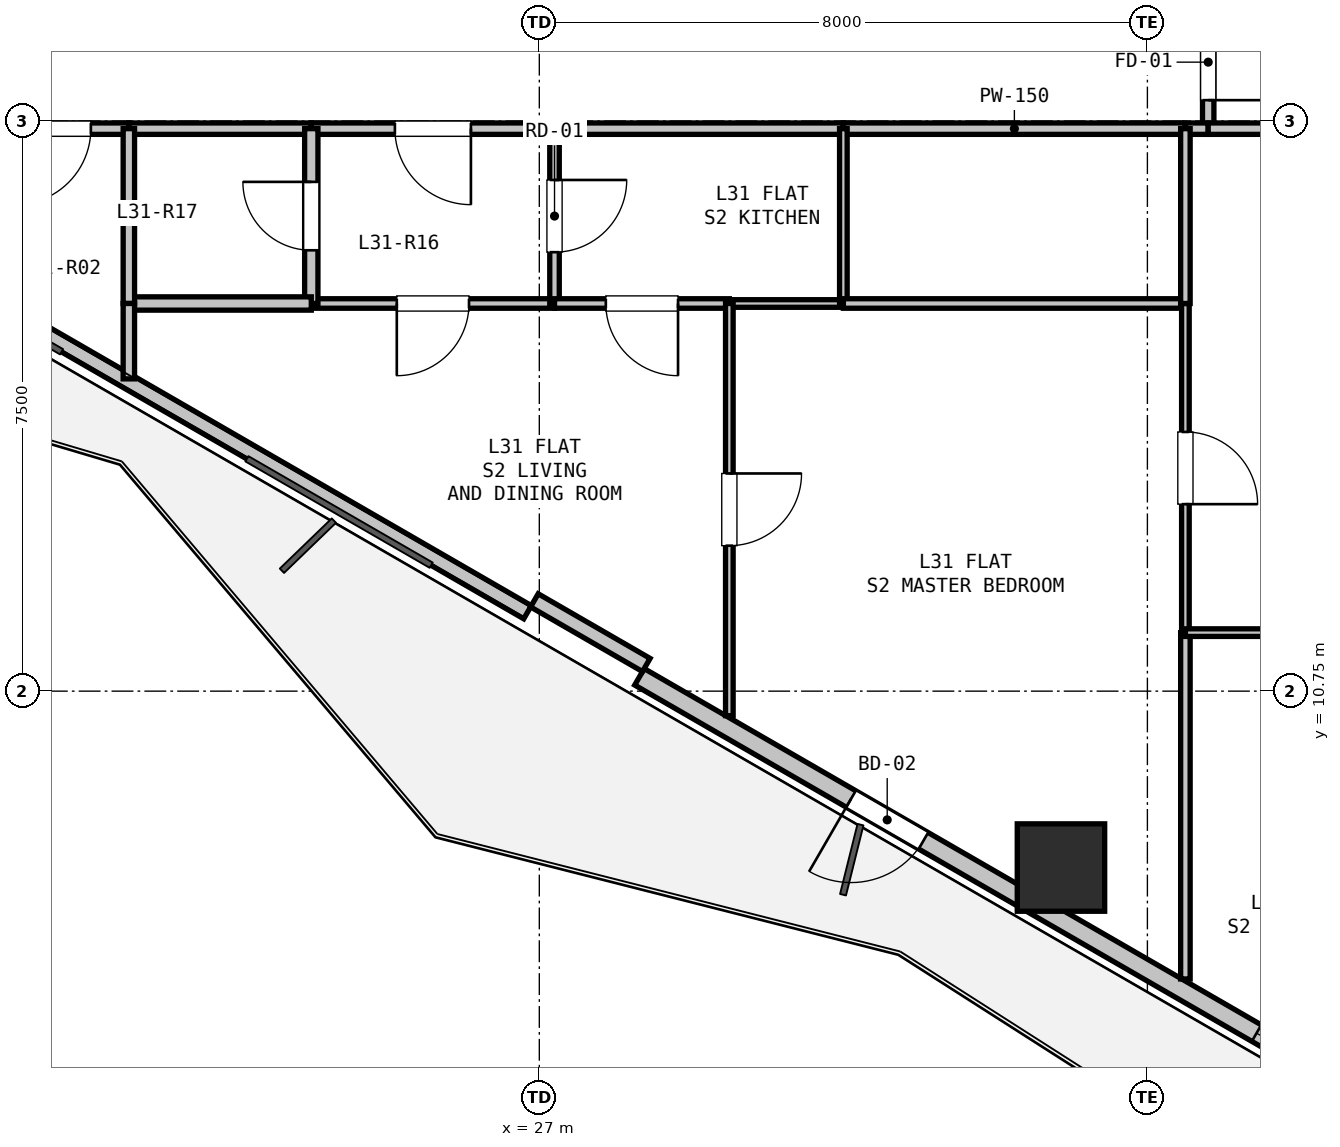
"""IFC4 building model, lengths in metres.
Left out: names, types, materials, properties, quantities, classifications, styles, units other than length and angle.
Written with IfcOpenShell. Run it as: python <this file> out.ifc"""

import sys

from ifc_helpers import new_model, si_unit, direction, frame, frame_2d, origin, origin_2d, place, context, subcontext, project, spatial, rectangle, hollow_rectangle, extrude, element, fill, save


model = new_model("IFC4")
c1 = context("Model", 3, precision=1e-05, world=origin(), true_north=direction((0.0, 1.0)))
c2 = subcontext(c1, "Body", "Model", "MODEL_VIEW")
j1 = project(units=[si_unit("LENGTHUNIT", "METRE"), si_unit("PLANEANGLEUNIT", "RADIAN")], contexts=[c1])
p1 = place(None, origin())
s1 = spatial("IfcSite", under=j1, at=p1, CompositionType="ELEMENT")
p2 = place(p1, origin())
s2 = spatial("IfcBuilding", under=s1, at=p2, CompositionType="ELEMENT")
p3 = place(p2, frame((0.0, 0.0, 113.1)))
s3 = spatial("IfcBuildingStorey", under=s2, at=p3, CompositionType="ELEMENT", Elevation=113.1)
p4 = place(p3, frame((33.863, 8.429, 0.0), z_axis=(0.0, 0.0, 1.0), x_axis=(1.0, 0.0, 0.0)))
e1 = element("IfcColumn", 1, at=p4, inside=s3, PredefinedType="COLUMN", context=c2, shape_type="SweptSolid", body=[
    extrude(hollow_rectangle(XDim=1.15, YDim=1.15, WallThickness=0.032, at=origin_2d()), origin(), (0.0, 0.0, 1.0), 3.3),
])
p5 = place(p3, frame((38.649, 4.973, 0.0), z_axis=(0.0, 0.0, 1.0), x_axis=(-0.866023023012, 0.500004123596, 0.0)))
e2 = element("IfcWall", 2, at=p5, inside=s3, PredefinedType="SOLIDWALL", context=c2, shape_type="SweptSolid", body=[
    extrude(rectangle(XDim=11.93, YDim=0.25, at=frame_2d((5.965, 0.0))), origin(), (0.0, 0.0, 1.0), 2.64),
])
p6 = place(p5, frame((7.616, 0.0, 0.0)))
e3 = element("IfcOpeningElement", 3, at=p6, cuts=e2, PredefinedType="OPENING", context=c2, shape_type="SweptSolid", body=[
    extrude(rectangle(XDim=1.1, YDim=2.1, at=frame_2d((0.55, 1.05))), frame((0.0, 0.135, 0.0), z_axis=(0.0, -1.0, 0.0), x_axis=(1.0, 0.0, 0.0)), (0.0, 0.0, 1.0), 0.27),
])
p7 = place(p5, frame((1.355, 0.0, 0.9)))
e4 = element("IfcOpeningElement", 4, at=p7, cuts=e2, PredefinedType="OPENING", context=c2, shape_type="SweptSolid", body=[
    extrude(rectangle(XDim=1.2, YDim=1.4, at=frame_2d((0.6, 0.7))), frame((0.0, 0.135, 0.0), z_axis=(0.0, -1.0, 0.0), x_axis=(1.0, 0.0, 0.0)), (0.0, 0.0, 1.0), 0.27),
])
p8 = place(p3, frame((26.845, 11.788, 0.0), z_axis=(0.0, 0.0, 1.0), x_axis=(-0.866027010039, 0.499997217876, 0.0)))
e5 = element("IfcWall", 5, at=p8, inside=s3, PredefinedType="PARAPET", context=c2, shape_type="SweptSolid", body=[
    extrude(rectangle(XDim=11.229, YDim=0.2, at=frame_2d((5.615, 0.0))), origin(), (0.0, 0.0, 1.0), 0.2),
])
p9 = place(p3, frame((28.407, 11.094, 0.0), z_axis=(0.0, 0.0, 1.0), x_axis=(-0.86605165483, 0.499954529098, 0.0)))
e6 = element("IfcWall", 6, at=p9, inside=s3, PredefinedType="PARAPET", context=c2, shape_type="SweptSolid", body=[
    extrude(rectangle(XDim=1.7, YDim=0.2, at=frame_2d((0.85, 0.0))), origin(), (0.0, 0.0, 1.0), 2.64),
])
p10 = place(p3, frame((35.8, 19.9, 0.0), z_axis=(0.0, 0.0, 1.0), x_axis=(0.0, -1.0, 0.0)))
e7 = element("IfcWall", 7, at=p10, inside=s3, PredefinedType="PARTITIONING", context=c2, shape_type="SweptSolid", body=[
    extrude(rectangle(XDim=1.75, YDim=0.15, at=frame_2d((0.875, 0.0))), origin(), (0.0, 0.0, 1.0), 3.02),
])
p11 = place(p10, frame((0.375, 0.0, 0.0)))
e8 = element("IfcOpeningElement", 8, at=p11, cuts=e7, PredefinedType="OPENING", context=c2, shape_type="SweptSolid", body=[
    extrude(rectangle(XDim=1.0, YDim=2.15, at=frame_2d((0.5, 1.075))), frame((0.0, 0.085, 0.0), z_axis=(0.0, -1.0, 0.0), x_axis=(1.0, 0.0, 0.0)), (0.0, 0.0, 1.0), 0.17),
])
p12 = place(p3, frame((35.8, 18.15, 0.0), z_axis=(0.0, 0.0, 1.0), x_axis=(-1.0, 0.0, 0.0)))
e9 = element("IfcWall", 9, at=p12, inside=s3, PredefinedType="PARTITIONING", context=c2, shape_type="SweptSolid", body=[
    extrude(rectangle(XDim=0.3, YDim=0.15, at=frame_2d((0.15, 0.0))), origin(), (0.0, 0.0, 1.0), 3.02),
])
p13 = place(p3, frame((35.5, 18.15, 0.0), z_axis=(0.0, 0.0, 1.0), x_axis=(-1.0, 0.0, 0.0)))
e10 = element("IfcWall", 10, at=p13, inside=s3, PredefinedType="PARTITIONING", context=c2, shape_type="SweptSolid", body=[
    extrude(rectangle(XDim=4.5, YDim=0.15, at=frame_2d((2.25, 0.0))), origin(), (0.0, 0.0, 1.0), 3.02),
])
p14 = place(p3, frame((31.0, 18.15, 0.0), z_axis=(0.0, 0.0, 1.0), x_axis=(-1.0, 0.0, 0.0)))
e11 = element("IfcWall", 11, at=p14, inside=s3, PredefinedType="PARTITIONING", context=c2, shape_type="SweptSolid", body=[
    extrude(rectangle(XDim=3.8, YDim=0.15, at=frame_2d((1.9, 0.0))), origin(), (0.0, 0.0, 1.0), 3.02),
])
p15 = place(p3, frame((27.2, 18.15, 0.0), z_axis=(0.0, 0.0, 1.0), x_axis=(-1.0, 0.0, 0.0)))
e12 = element("IfcWall", 12, at=p15, inside=s3, PredefinedType="PARTITIONING", context=c2, shape_type="SweptSolid", body=[
    extrude(rectangle(XDim=3.2, YDim=0.15, at=frame_2d((1.6, 0.0))), origin(), (0.0, 0.0, 1.0), 2.393),
])
p16 = place(p15, frame((1.1, 0.0, 0.0)))
e13 = element("IfcOpeningElement", 13, at=p16, cuts=e12, PredefinedType="OPENING", context=c2, shape_type="SweptSolid", body=[
    extrude(rectangle(XDim=1.0, YDim=2.15, at=frame_2d((0.5, 1.075))), frame((0.0, 0.085, 0.0), z_axis=(0.0, -1.0, 0.0), x_axis=(1.0, 0.0, 0.0)), (0.0, 0.0, 1.0), 0.17),
])
p17 = place(p3, frame((24.0, 18.15, 0.0), z_axis=(0.0, 0.0, 1.0), x_axis=(-1.0, 0.0, 0.0)))
e14 = element("IfcWall", 14, at=p17, inside=s3, PredefinedType="PARTITIONING", context=c2, shape_type="SweptSolid", body=[
    extrude(rectangle(XDim=2.4, YDim=0.15, at=frame_2d((1.2, 0.0))), origin(), (0.0, 0.0, 1.0), 2.393),
])
p18 = place(p3, frame((21.6, 18.15, 0.0), z_axis=(0.0, 0.0, 1.0), x_axis=(-1.0, 0.0, 0.0)))
e15 = element("IfcWall", 15, at=p18, inside=s3, PredefinedType="PARTITIONING", context=c2, shape_type="SweptSolid", body=[
    extrude(rectangle(XDim=2.0, YDim=0.15, at=frame_2d((1.0, 0.0))), origin(), (0.0, 0.0, 1.0), 3.02),
])
p19 = place(p18, frame((0.5, 0.0, 0.0)))
e16 = element("IfcOpeningElement", 16, at=p19, cuts=e15, PredefinedType="OPENING", context=c2, shape_type="SweptSolid", body=[
    extrude(rectangle(XDim=1.0, YDim=2.15, at=frame_2d((0.5, 1.075))), frame((0.0, 0.085, 0.0), z_axis=(0.0, -1.0, 0.0), x_axis=(1.0, 0.0, 0.0)), (0.0, 0.0, 1.0), 0.17),
])
p20 = place(p3, frame((38.4, 18.15, 0.0), z_axis=(0.0, 0.0, 1.0), x_axis=(-1.0, 0.0, 0.0)))
e17 = element("IfcWall", 17, at=p20, inside=s3, PredefinedType="PARTITIONING", context=c2, shape_type="SweptSolid", body=[
    extrude(rectangle(XDim=2.6, YDim=0.15, at=frame_2d((1.3, 0.0))), origin(), (0.0, 0.0, 1.0), 2.393),
])
p21 = place(p3, frame((27.2, 15.85, 0.0), z_axis=(0.0, 0.0, 1.0), x_axis=(-1.0, 0.0, 0.0)))
e18 = element("IfcWall", 18, at=p21, inside=s3, PredefinedType="PARTITIONING", context=c2, shape_type="SweptSolid", body=[
    extrude(rectangle(XDim=3.2, YDim=0.125, at=frame_2d((1.6, 0.0))), origin(), (0.0, 0.0, 1.0), 2.393),
])
p22 = place(p21, frame((1.125, 0.0, 0.0)))
e19 = element("IfcOpeningElement", 19, at=p22, cuts=e18, PredefinedType="OPENING", context=c2, shape_type="SweptSolid", body=[
    extrude(rectangle(XDim=0.95, YDim=2.1, at=frame_2d((0.475, 1.05))), frame((0.0, 0.073, 0.0), z_axis=(0.0, -1.0, 0.0), x_axis=(1.0, 0.0, 0.0)), (0.0, 0.0, 1.0), 0.145),
])
p23 = place(p3, frame((24.0, 15.85, 0.0), z_axis=(0.0, 0.0, 1.0), x_axis=(0.0, 1.0, 0.0)))
e20 = element("IfcWall", 20, at=p23, inside=s3, PredefinedType="PLUMBINGWALL", context=c2, shape_type="SweptSolid", body=[
    extrude(rectangle(XDim=2.3, YDim=0.175, at=frame_2d((1.15, 0.0))), origin(), (0.0, 0.0, 1.0), 2.393),
])
p24 = place(p23, frame((0.7, 0.0, 0.0)))
e21 = element("IfcOpeningElement", 21, at=p24, cuts=e20, PredefinedType="OPENING", context=c2, shape_type="SweptSolid", body=[
    extrude(rectangle(XDim=0.9, YDim=2.1, at=frame_2d((0.45, 1.05))), frame((0.0, 0.097, 0.0), z_axis=(0.0, -1.0, 0.0), x_axis=(1.0, 0.0, 0.0)), (0.0, 0.0, 1.0), 0.195),
])
p25 = place(p3, frame((27.2, 18.15, 0.0), z_axis=(0.0, 0.0, 1.0), x_axis=(0.0, -1.0, 0.0)))
e22 = element("IfcWall", 22, at=p25, inside=s3, PredefinedType="PARTITIONING", context=c2, shape_type="SweptSolid", body=[
    extrude(rectangle(XDim=2.3, YDim=0.125, at=frame_2d((1.15, 0.0))), origin(), (0.0, 0.0, 1.0), 3.02),
])
p26 = place(p25, frame((0.675, 0.0, 0.0)))
e23 = element("IfcOpeningElement", 23, at=p26, cuts=e22, PredefinedType="OPENING", context=c2, shape_type="SweptSolid", body=[
    extrude(rectangle(XDim=0.95, YDim=2.1, at=frame_2d((0.475, 1.05))), frame((0.0, 0.073, 0.0), z_axis=(0.0, -1.0, 0.0), x_axis=(1.0, 0.0, 0.0)), (0.0, 0.0, 1.0), 0.145),
])
p27 = place(p3, frame((24.0, 15.85, 0.0), z_axis=(0.0, 0.0, 1.0), x_axis=(-1.0, 0.0, 0.0)))
e24 = element("IfcWall", 24, at=p27, inside=s3, PredefinedType="PLUMBINGWALL", context=c2, shape_type="SweptSolid", body=[
    extrude(rectangle(XDim=2.4, YDim=0.175, at=frame_2d((1.2, 0.0))), origin(), (0.0, 0.0, 1.0), 3.02),
])
p28 = place(p3, frame((21.6, 15.85, 0.0), z_axis=(0.0, 0.0, 1.0), x_axis=(0.0, 1.0, 0.0)))
e25 = element("IfcWall", 25, at=p28, inside=s3, PredefinedType="PARTITIONING", context=c2, shape_type="SweptSolid", body=[
    extrude(rectangle(XDim=2.3, YDim=0.15, at=frame_2d((1.15, 0.0))), origin(), (0.0, 0.0, 1.0), 3.02),
])
p29 = place(p3, frame((31.0, 15.85, 0.0), z_axis=(0.0, 0.0, 1.0), x_axis=(-1.0, 0.0, 0.0)))
e26 = element("IfcWall", 26, at=p29, inside=s3, PredefinedType="PARTITIONING", context=c2, shape_type="SweptSolid", body=[
    extrude(rectangle(XDim=1.5, YDim=0.1, at=frame_2d((0.75, 0.0))), origin(), (0.0, 0.0, 1.0), 3.02),
])
p30 = place(p3, frame((29.5, 15.85, 0.0), z_axis=(0.0, 0.0, 1.0), x_axis=(-1.0, 0.0, 0.0)))
e27 = element("IfcWall", 27, at=p30, inside=s3, PredefinedType="PARTITIONING", context=c2, shape_type="SweptSolid", body=[
    extrude(rectangle(XDim=2.3, YDim=0.125, at=frame_2d((1.15, 0.0))), origin(), (0.0, 0.0, 1.0), 3.02),
])
p31 = place(p30, frame((0.675, 0.0, 0.0)))
e28 = element("IfcOpeningElement", 28, at=p31, cuts=e27, PredefinedType="OPENING", context=c2, shape_type="SweptSolid", body=[
    extrude(rectangle(XDim=0.95, YDim=2.1, at=frame_2d((0.475, 1.05))), frame((0.0, 0.073, 0.0), z_axis=(0.0, -1.0, 0.0), x_axis=(1.0, 0.0, 0.0)), (0.0, 0.0, 1.0), 0.145),
])
p32 = place(p3, frame((31.0, 18.15, 0.0), z_axis=(0.0, 0.0, 1.0), x_axis=(0.0, -1.0, 0.0)))
e29 = element("IfcWall", 29, at=p32, inside=s3, PredefinedType="PARTITIONING", context=c2, shape_type="SweptSolid", body=[
    extrude(rectangle(XDim=2.3, YDim=0.1, at=frame_2d((1.15, 0.0))), origin(), (0.0, 0.0, 1.0), 3.02),
])
p33 = place(p3, frame((21.6, 15.85, 0.0), z_axis=(0.0, 0.0, 1.0), x_axis=(0.0, -1.0, 0.0)))
e30 = element("IfcWall", 30, at=p33, inside=s3, PredefinedType="PARTITIONING", context=c2, shape_type="SweptSolid", body=[
    extrude(rectangle(XDim=0.992, YDim=0.15, at=frame_2d((0.496, 0.0))), origin(), (0.0, 0.0, 1.0), 2.365),
])
p34 = place(p3, frame((29.5, 15.85, 0.0), z_axis=(0.0, 0.0, 1.0), x_axis=(0.0, -1.0, 0.0)))
e31 = element("IfcWall", 31, at=p34, inside=s3, PredefinedType="PARTITIONING", context=c2, shape_type="SweptSolid", body=[
    extrude(rectangle(XDim=5.423, YDim=0.1, at=frame_2d((2.711, 0.0))), origin(), (0.0, 0.0, 1.0), 2.365),
])
p35 = place(p34, frame((2.236, 0.0, 0.0)))
e32 = element("IfcOpeningElement", 32, at=p35, cuts=e31, PredefinedType="OPENING", context=c2, shape_type="SweptSolid", body=[
    extrude(rectangle(XDim=0.95, YDim=2.1, at=frame_2d((0.475, 1.05))), frame((0.0, 0.06, 0.0), z_axis=(0.0, -1.0, 0.0), x_axis=(1.0, 0.0, 0.0)), (0.0, 0.0, 1.0), 0.12),
])
p36 = place(p3, frame((31.0, 15.85, 0.0), z_axis=(0.0, 0.0, 1.0), x_axis=(1.0, 0.0, 0.0)))
e33 = element("IfcWall", 33, at=p36, inside=s3, PredefinedType="PARTITIONING", context=c2, shape_type="SweptSolid", body=[
    extrude(rectangle(XDim=4.5, YDim=0.125, at=frame_2d((2.25, 0.0))), origin(), (0.0, 0.0, 1.0), 3.02),
])
p37 = place(p3, frame((35.5, 15.85, 0.0), z_axis=(0.0, 0.0, 1.0), x_axis=(0.0, -1.0, 0.0)))
e34 = element("IfcWall", 34, at=p37, inside=s3, PredefinedType="PARTITIONING", context=c2, shape_type="SweptSolid", body=[
    extrude(rectangle(XDim=4.33, YDim=0.1, at=frame_2d((2.165, 0.0))), origin(), (0.0, 0.0, 1.0), 3.02),
])
p38 = place(p37, frame((1.69, 0.0, 0.0)))
e35 = element("IfcOpeningElement", 35, at=p38, cuts=e34, PredefinedType="OPENING", context=c2, shape_type="SweptSolid", body=[
    extrude(rectangle(XDim=0.95, YDim=2.1, at=frame_2d((0.475, 1.05))), frame((0.0, 0.06, 0.0), z_axis=(0.0, -1.0, 0.0), x_axis=(1.0, 0.0, 0.0)), (0.0, 0.0, 1.0), 0.12),
])
p39 = place(p3, frame((35.5, 11.52, 0.0), z_axis=(0.0, 0.0, 1.0), x_axis=(0.0, -1.0, 0.0)))
e36 = element("IfcWall", 36, at=p39, inside=s3, PredefinedType="PARTITIONING", context=c2, shape_type="SweptSolid", body=[
    extrude(rectangle(XDim=4.557, YDim=0.125, at=frame_2d((2.278, 0.0))), origin(), (0.0, 0.0, 1.0), 2.684),
])
p40 = place(p3, frame((35.5, 11.52, 0.0), z_axis=(0.0, 0.0, 1.0), x_axis=(1.0, 0.0, 0.0)))
e37 = element("IfcWall", 37, at=p40, inside=s3, PredefinedType="PARTITIONING", context=c2, shape_type="SweptSolid", body=[
    extrude(rectangle(XDim=3.77, YDim=0.1, at=frame_2d((1.885, 0.0))), origin(), (0.0, 0.0, 1.0), 3.02),
])
p41 = place(p40, frame((1.41, 0.0, 0.0)))
e38 = element("IfcOpeningElement", 38, at=p41, cuts=e37, PredefinedType="OPENING", context=c2, shape_type="SweptSolid", body=[
    extrude(rectangle(XDim=0.95, YDim=2.1, at=frame_2d((0.475, 1.05))), frame((0.0, 0.06, 0.0), z_axis=(0.0, -1.0, 0.0), x_axis=(1.0, 0.0, 0.0)), (0.0, 0.0, 1.0), 0.12),
])
p42 = place(p3, frame((35.5, 15.85, 0.0), z_axis=(0.0, 0.0, 1.0), x_axis=(0.0, 1.0, 0.0)))
e39 = element("IfcWall", 39, at=p42, inside=s3, PredefinedType="PARTITIONING", context=c2, shape_type="SweptSolid", body=[
    extrude(rectangle(XDim=2.3, YDim=0.125, at=frame_2d((1.15, 0.0))), origin(), (0.0, 0.0, 1.0), 3.02),
])
p43 = place(p6, origin())
e40 = element("IfcDoor", 40, at=p43, inside=s3, OperationType="SINGLE_SWING_RIGHT", PredefinedType="DOOR", context=c2, shape_type="SweptSolid", body=[
    extrude(rectangle(XDim=1.1, YDim=2.1, at=frame_2d((0.55, 1.05))), frame((0.0, 0.025, 0.0), z_axis=(0.0, -1.0, 0.0), x_axis=(1.0, 0.0, 0.0)), (0.0, 0.0, 1.0), 0.05),
])
fill(e3, e40)
p44 = place(p7, origin())
e41 = element("IfcWindow", 41, at=p44, inside=s3, PartitioningType="SINGLE_PANEL", PredefinedType="WINDOW", context=c2, shape_type="SweptSolid", body=[
    extrude(rectangle(XDim=1.2, YDim=1.4, at=frame_2d((0.6, 0.7))), frame((0.0, 0.03, 0.0), z_axis=(0.0, -1.0, 0.0), x_axis=(1.0, 0.0, 0.0)), (0.0, 0.0, 1.0), 0.06),
])
fill(e4, e41)
p45 = place(p11, origin())
e42 = element("IfcDoor", 42, at=p45, inside=s3, OperationType="SINGLE_SWING_RIGHT", PredefinedType="DOOR", context=c2, shape_type="SweptSolid", body=[
    extrude(rectangle(XDim=1.0, YDim=2.15, at=frame_2d((0.5, 1.075))), frame((0.0, 0.025, 0.0), z_axis=(0.0, -1.0, 0.0), x_axis=(1.0, 0.0, 0.0)), (0.0, 0.0, 1.0), 0.05),
])
fill(e8, e42)
p46 = place(p16, origin())
e43 = element("IfcDoor", 43, at=p46, inside=s3, OperationType="SINGLE_SWING_LEFT", PredefinedType="DOOR", context=c2, shape_type="SweptSolid", body=[
    extrude(rectangle(XDim=1.0, YDim=2.15, at=frame_2d((0.5, 1.075))), frame((0.0, 0.025, 0.0), z_axis=(0.0, -1.0, 0.0), x_axis=(1.0, 0.0, 0.0)), (0.0, 0.0, 1.0), 0.05),
])
fill(e13, e43)
p47 = place(p19, origin())
e44 = element("IfcDoor", 44, at=p47, inside=s3, OperationType="SINGLE_SWING_RIGHT", PredefinedType="DOOR", context=c2, shape_type="SweptSolid", body=[
    extrude(rectangle(XDim=1.0, YDim=2.15, at=frame_2d((0.5, 1.075))), frame((0.0, 0.025, 0.0), z_axis=(0.0, -1.0, 0.0), x_axis=(1.0, 0.0, 0.0)), (0.0, 0.0, 1.0), 0.05),
])
fill(e16, e44)
p48 = place(p24, origin())
e45 = element("IfcDoor", 45, at=p48, inside=s3, OperationType="SINGLE_SWING_RIGHT", PredefinedType="DOOR", context=c2, shape_type="SweptSolid", body=[
    extrude(rectangle(XDim=0.9, YDim=2.1, at=frame_2d((0.45, 1.05))), frame((0.0, 0.025, 0.0), z_axis=(0.0, -1.0, 0.0), x_axis=(1.0, 0.0, 0.0)), (0.0, 0.0, 1.0), 0.05),
])
fill(e21, e45)
p49 = place(p26, origin())
e46 = element("IfcDoor", 46, at=p49, inside=s3, OperationType="SINGLE_SWING_LEFT", PredefinedType="DOOR", context=c2, shape_type="SweptSolid", body=[
    extrude(rectangle(XDim=0.95, YDim=2.1, at=frame_2d((0.475, 1.05))), frame((0.0, 0.025, 0.0), z_axis=(0.0, -1.0, 0.0), x_axis=(1.0, 0.0, 0.0)), (0.0, 0.0, 1.0), 0.05),
])
fill(e23, e46)
p50 = place(p22, origin())
e47 = element("IfcDoor", 47, at=p50, inside=s3, OperationType="SINGLE_SWING_RIGHT", PredefinedType="DOOR", context=c2, shape_type="SweptSolid", body=[
    extrude(rectangle(XDim=0.95, YDim=2.1, at=frame_2d((0.475, 1.05))), frame((0.0, 0.025, 0.0), z_axis=(0.0, -1.0, 0.0), x_axis=(1.0, 0.0, 0.0)), (0.0, 0.0, 1.0), 0.05),
])
fill(e19, e47)
p51 = place(p31, origin())
e48 = element("IfcDoor", 48, at=p51, inside=s3, OperationType="SINGLE_SWING_LEFT", PredefinedType="DOOR", context=c2, shape_type="SweptSolid", body=[
    extrude(rectangle(XDim=0.95, YDim=2.1, at=frame_2d((0.475, 1.05))), frame((0.0, 0.025, 0.0), z_axis=(0.0, -1.0, 0.0), x_axis=(1.0, 0.0, 0.0)), (0.0, 0.0, 1.0), 0.05),
])
fill(e28, e48)
p52 = place(p35, origin())
e49 = element("IfcDoor", 49, at=p52, inside=s3, OperationType="SINGLE_SWING_LEFT", PredefinedType="DOOR", context=c2, shape_type="SweptSolid", body=[
    extrude(rectangle(XDim=0.95, YDim=2.1, at=frame_2d((0.475, 1.05))), frame((0.0, 0.025, 0.0), z_axis=(0.0, -1.0, 0.0), x_axis=(1.0, 0.0, 0.0)), (0.0, 0.0, 1.0), 0.05),
])
fill(e32, e49)
p53 = place(p38, origin())
e50 = element("IfcDoor", 50, at=p53, inside=s3, OperationType="SINGLE_SWING_RIGHT", PredefinedType="DOOR", context=c2, shape_type="SweptSolid", body=[
    extrude(rectangle(XDim=0.95, YDim=2.1, at=frame_2d((0.475, 1.05))), frame((0.0, 0.025, 0.0), z_axis=(0.0, -1.0, 0.0), x_axis=(1.0, 0.0, 0.0)), (0.0, 0.0, 1.0), 0.05),
])
fill(e35, e50)
save(model, sys.argv[1])
